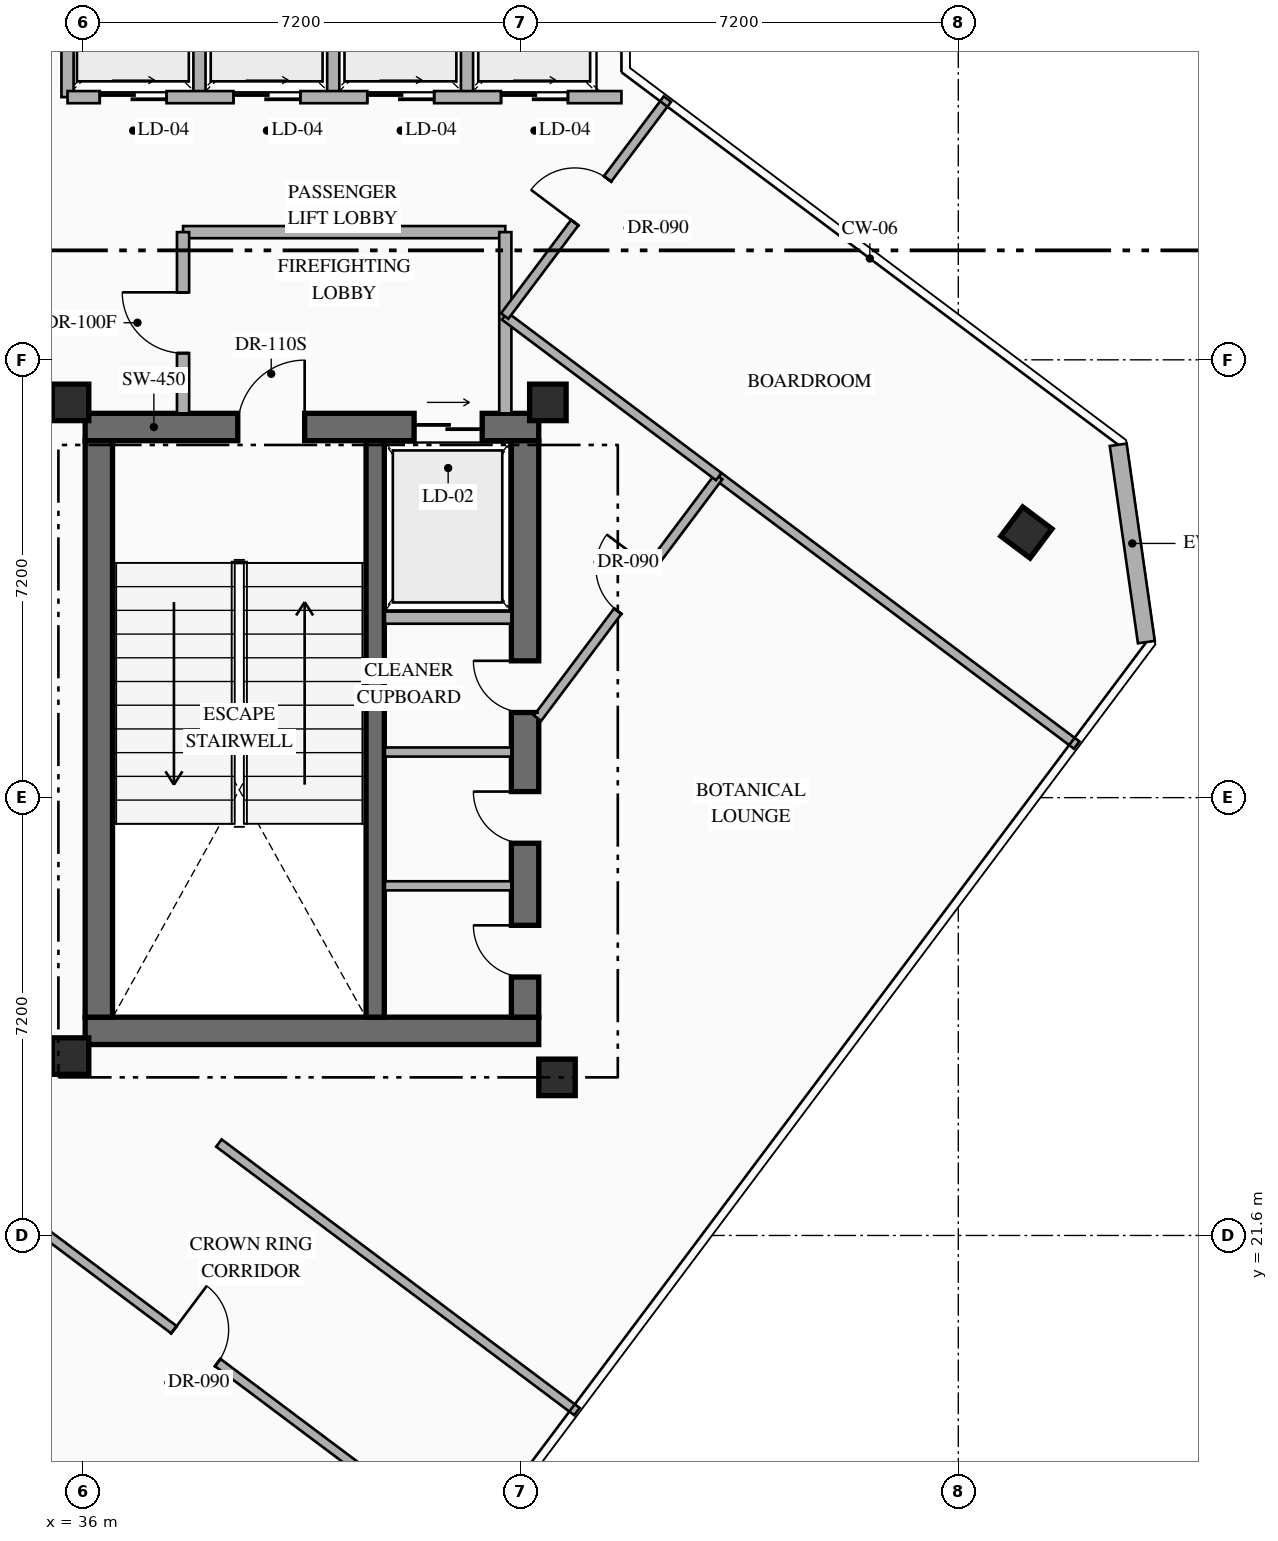
"""IFC4 building model, lengths in metres.
Left out: names, types, materials, properties, quantities, classifications, styles, units other than length and angle.
Written with IfcOpenShell. Run it as: python <this file> out.ifc"""

import sys

from ifc_helpers import new_model, si_unit, direction, frame, frame_2d, origin, origin_2d, place, context, subcontext, project, spatial, rectangle, hollow_rectangle, extrude, element, fill, save


model = new_model("IFC4")
c1 = context("Model", 3, precision=1e-05, world=origin(), true_north=direction((0.0, 1.0)))
c2 = subcontext(c1, "Body", "Model", "MODEL_VIEW")
j1 = project(units=[si_unit("LENGTHUNIT", "METRE"), si_unit("PLANEANGLEUNIT", "RADIAN")], contexts=[c1])
p1 = place(None, origin())
s1 = spatial("IfcSite", under=j1, at=p1, CompositionType="ELEMENT")
p2 = place(p1, origin())
s2 = spatial("IfcBuilding", under=s1, at=p2, CompositionType="ELEMENT")
p3 = place(p2, frame((0.0, 0.0, 273.95)))
s3 = spatial("IfcBuildingStorey", under=s2, at=p3, CompositionType="ELEMENT", Elevation=273.95)
p4 = place(p3, frame((36.04, 24.965, 0.0), z_axis=(0.0, 0.0, 1.0), x_axis=(1.0, 0.0, 0.0)))
e1 = element("IfcWall", 1, at=p4, inside=s3, PredefinedType="SHEAR", context=c2, shape_type="SweptSolid", body=[
    extrude(rectangle(XDim=7.46, YDim=0.45, at=frame_2d((3.73, 0.0))), origin(), (0.0, 0.0, 1.0), 4.0),
])
p5 = place(p3, frame((36.04, 34.895, 0.0), z_axis=(0.0, 0.0, 1.0), x_axis=(1.0, 0.0, 0.0)))
e2 = element("IfcWall", 2, at=p5, inside=s3, PredefinedType="SHEAR", context=c2, shape_type="SweptSolid", body=[
    extrude(rectangle(XDim=7.46, YDim=0.45, at=frame_2d((3.73, 0.0))), origin(), (0.0, 0.0, 1.0), 4.0),
])
p6 = place(p5, frame((2.51, 0.0, 0.0)))
e3 = element("IfcOpeningElement", 3, at=p6, cuts=e2, PredefinedType="OPENING", context=c2, shape_type="SweptSolid", body=[
    extrude(rectangle(XDim=1.1, YDim=2.2, at=frame_2d((0.55, 1.1))), frame((0.0, 0.235, 0.0), z_axis=(0.0, -1.0, 0.0), x_axis=(1.0, 0.0, 0.0)), (0.0, 0.0, 1.0), 0.47),
])
p7 = place(p5, frame((5.41, 0.0, 0.0)))
e4 = element("IfcOpeningElement", 4, at=p7, cuts=e2, PredefinedType="OPENING", context=c2, shape_type="SweptSolid", body=[
    extrude(rectangle(XDim=1.12, YDim=2.15, at=frame_2d((0.56, 1.075))), frame((0.0, 0.235, 0.0), z_axis=(0.0, -1.0, 0.0), x_axis=(1.0, 0.0, 0.0)), (0.0, 0.0, 1.0), 0.47),
])
p8 = place(p3, frame((36.265, 25.19, 0.0), z_axis=(0.0, 0.0, 1.0), x_axis=(0.0, 1.0, 0.0)))
e5 = element("IfcWall", 5, at=p8, inside=s3, PredefinedType="SHEAR", context=c2, shape_type="SweptSolid", body=[
    extrude(rectangle(XDim=9.48, YDim=0.45, at=frame_2d((4.74, 0.0))), origin(), (0.0, 0.0, 1.0), 4.0),
])
p9 = place(p3, frame((43.275, 25.19, 0.0), z_axis=(0.0, 0.0, 1.0), x_axis=(0.0, 1.0, 0.0)))
e6 = element("IfcWall", 6, at=p9, inside=s3, PredefinedType="SHEAR", context=c2, shape_type="SweptSolid", body=[
    extrude(rectangle(XDim=9.48, YDim=0.45, at=frame_2d((4.74, 0.0))), origin(), (0.0, 0.0, 1.0), 4.0),
])
p10 = place(p9, frame((0.66, 0.0, 0.0)))
e7 = element("IfcOpeningElement", 7, at=p10, cuts=e6, PredefinedType="OPENING", context=c2, shape_type="SweptSolid", body=[
    extrude(rectangle(XDim=0.85, YDim=2.08, at=frame_2d((0.425, 1.04))), frame((0.0, 0.235, 0.0), z_axis=(0.0, -1.0, 0.0), x_axis=(1.0, 0.0, 0.0)), (0.0, 0.0, 1.0), 0.47),
])
p11 = place(p9, frame((2.86, 0.0, 0.0)))
e8 = element("IfcOpeningElement", 8, at=p11, cuts=e6, PredefinedType="OPENING", context=c2, shape_type="SweptSolid", body=[
    extrude(rectangle(XDim=0.85, YDim=2.08, at=frame_2d((0.425, 1.04))), frame((0.0, 0.235, 0.0), z_axis=(0.0, -1.0, 0.0), x_axis=(1.0, 0.0, 0.0)), (0.0, 0.0, 1.0), 0.47),
])
p12 = place(p9, frame((5.01, 0.0, 0.0)))
e9 = element("IfcOpeningElement", 9, at=p12, cuts=e6, PredefinedType="OPENING", context=c2, shape_type="SweptSolid", body=[
    extrude(rectangle(XDim=0.85, YDim=2.08, at=frame_2d((0.425, 1.04))), frame((0.0, 0.235, 0.0), z_axis=(0.0, -1.0, 0.0), x_axis=(1.0, 0.0, 0.0)), (0.0, 0.0, 1.0), 0.47),
])
p13 = place(p3, frame((40.81, 25.19, 0.0), z_axis=(0.0, 0.0, 1.0), x_axis=(0.0, 1.0, 0.0)))
e10 = element("IfcWall", 10, at=p13, inside=s3, PredefinedType="SHEAR", context=c2, shape_type="SweptSolid", body=[
    extrude(rectangle(XDim=9.48, YDim=0.3, at=frame_2d((4.74, 0.0))), origin(), (0.0, 0.0, 1.0), 4.0),
])
for number, where, z_axis, x_axis in (
    (11, (35.8, 24.55, 0.0), (0.0, 0.0, 1.0), (1.0, 0.0, 0.0)),
    (12, (43.8, 24.2, 0.0), (0.0, 0.0, 1.0), (1.0, 0.0, 0.0)),
    (13, (35.8, 35.3, 0.0), (0.0, 0.0, 1.0), (1.0, 0.0, 0.0)),
    (14, (43.65, 35.3, 0.0), (0.0, 0.0, 1.0), (1.0, 0.0, 0.0)),
    (15, (51.52, 33.16, 0.0), (0.0, 0.0, 1.0), (0.8, -0.6, 0.0)),
):
    element("IfcColumn", number, at=place(p3, frame(where, z_axis=z_axis, x_axis=x_axis)), inside=s3, PredefinedType="COLUMN", context=c2, shape_type="SweptSolid", body=[
        extrude(hollow_rectangle(XDim=0.6, YDim=0.6, WallThickness=0.025, at=origin_2d()), origin(), (0.0, 0.0, 1.0), 4.0),
    ])
p14 = place(p3, frame((53.03, 34.603, 0.0), z_axis=(0.0, 0.0, 1.0), x_axis=(0.141212810973, -0.989979263428, 0.0)))
e16 = element("IfcWall", 16, at=p14, inside=s3, PredefinedType="STANDARD", context=c2, shape_type="SweptSolid", body=[
    extrude(rectangle(XDim=3.278, YDim=0.28, at=frame_2d((1.639, 0.0))), origin(), (0.0, 0.0, 1.0), 3.75),
])
p15 = place(p3, frame((40.97, 31.76, 0.0), z_axis=(0.0, 0.0, 1.0), x_axis=(1.0, 0.0, 0.0)))
e17 = element("IfcWall", 17, at=p15, inside=s3, PredefinedType="STANDARD", context=c2, shape_type="SweptSolid", body=[
    extrude(rectangle(XDim=2.08, YDim=0.2, at=frame_2d((1.04, 0.0))), origin(), (0.0, 0.0, 1.0), 3.75),
])
for number, where, z_axis, x_axis in (
    (18, (40.97, 27.35, 0.0), (0.0, 0.0, 1.0), (1.0, 0.0, 0.0)),
    (19, (40.97, 29.55, 0.0), (0.0, 0.0, 1.0), (1.0, 0.0, 0.0)),
):
    element("IfcWall", number, at=place(p3, frame(where, z_axis=z_axis, x_axis=x_axis)), inside=s3, PredefinedType="PARTITIONING", context=c2, shape_type="SweptSolid", body=[
        extrude(rectangle(XDim=2.08, YDim=0.15, at=frame_2d((1.04, 0.0))), origin(), (0.0, 0.0, 1.0), 3.75),
    ])
p16 = place(p3, frame((37.65, 38.1, 0.0), z_axis=(0.0, 0.0, 1.0), x_axis=(1.0, 0.0, 0.0)))
e20 = element("IfcWall", 20, at=p16, inside=s3, PredefinedType="STANDARD", context=c2, shape_type="SweptSolid", body=[
    extrude(rectangle(XDim=5.3, YDim=0.2, at=frame_2d((2.65, 0.0))), origin(), (0.0, 0.0, 1.0), 3.75),
])
p17 = place(p3, frame((42.95, 35.12, 0.0), z_axis=(0.0, 0.0, 1.0), x_axis=(0.0, 1.0, 0.0)))
e21 = element("IfcWall", 21, at=p17, inside=s3, PredefinedType="STANDARD", context=c2, shape_type="SweptSolid", body=[
    extrude(rectangle(XDim=2.98, YDim=0.2, at=frame_2d((1.49, 0.0))), origin(), (0.0, 0.0, 1.0), 3.75),
])
p18 = place(p3, frame((37.65, 35.12, 0.0), z_axis=(0.0, 0.0, 1.0), x_axis=(0.0, 1.0, 0.0)))
e22 = element("IfcWall", 22, at=p18, inside=s3, PredefinedType="STANDARD", context=c2, shape_type="SweptSolid", body=[
    extrude(rectangle(XDim=2.98, YDim=0.2, at=frame_2d((1.49, 0.0))), origin(), (0.0, 0.0, 1.0), 3.75),
])
p19 = place(p18, frame((0.99, 0.0, 0.0)))
e23 = element("IfcOpeningElement", 23, at=p19, cuts=e22, PredefinedType="OPENING", context=c2, shape_type="SweptSolid", body=[
    extrude(rectangle(XDim=1.0, YDim=2.2, at=frame_2d((0.5, 1.1))), frame((0.0, 0.11, 0.0), z_axis=(0.0, -1.0, 0.0), x_axis=(1.0, 0.0, 0.0)), (0.0, 0.0, 1.0), 0.22),
])
for number, where, z_axis, x_axis in (
    (24, (35.75, 40.32, 0.0), (0.0, 0.0, 1.0), (0.0, 1.0, 0.0)),
    (25, (37.92, 40.32, 0.0), (0.0, 0.0, 1.0), (0.0, 1.0, 0.0)),
    (26, (40.12, 40.32, 0.0), (0.0, 0.0, 1.0), (0.0, 1.0, 0.0)),
    (27, (42.32, 40.32, 0.0), (0.0, 0.0, 1.0), (0.0, 1.0, 0.0)),
):
    element("IfcWall", number, at=place(p3, frame(where, z_axis=z_axis, x_axis=x_axis)), inside=s3, PredefinedType="STANDARD", context=c2, shape_type="SweptSolid", body=[
        extrude(rectangle(XDim=2.16, YDim=0.2, at=frame_2d((1.08, 0.0))), origin(), (0.0, 0.0, 1.0), 3.75),
    ])
p20 = place(p3, frame((35.75, 40.32, 0.0), z_axis=(0.0, 0.0, 1.0), x_axis=(1.0, 0.0, 0.0)))
e28 = element("IfcWall", 28, at=p20, inside=s3, PredefinedType="STANDARD", context=c2, shape_type="SweptSolid", body=[
    extrude(rectangle(XDim=9.11, YDim=0.2, at=frame_2d((4.555, 0.0))), origin(), (0.0, 0.0, 1.0), 3.75),
])
p21 = place(p20, frame((0.53, 0.0, 0.0)))
e29 = element("IfcOpeningElement", 29, at=p21, cuts=e28, PredefinedType="OPENING", context=c2, shape_type="SweptSolid", body=[
    extrude(rectangle(XDim=1.1, YDim=2.18, at=frame_2d((0.55, 1.09))), frame((0.0, 0.11, 0.0), z_axis=(0.0, -1.0, 0.0), x_axis=(1.0, 0.0, 0.0)), (0.0, 0.0, 1.0), 0.22),
])
p22 = place(p20, frame((2.73, 0.0, 0.0)))
e30 = element("IfcOpeningElement", 30, at=p22, cuts=e28, PredefinedType="OPENING", context=c2, shape_type="SweptSolid", body=[
    extrude(rectangle(XDim=1.1, YDim=2.18, at=frame_2d((0.55, 1.09))), frame((0.0, 0.11, 0.0), z_axis=(0.0, -1.0, 0.0), x_axis=(1.0, 0.0, 0.0)), (0.0, 0.0, 1.0), 0.22),
])
p23 = place(p20, frame((4.93, 0.0, 0.0)))
e31 = element("IfcOpeningElement", 31, at=p23, cuts=e28, PredefinedType="OPENING", context=c2, shape_type="SweptSolid", body=[
    extrude(rectangle(XDim=1.1, YDim=2.18, at=frame_2d((0.55, 1.09))), frame((0.0, 0.11, 0.0), z_axis=(0.0, -1.0, 0.0), x_axis=(1.0, 0.0, 0.0)), (0.0, 0.0, 1.0), 0.22),
])
p24 = place(p20, frame((7.13, 0.0, 0.0)))
e32 = element("IfcOpeningElement", 32, at=p24, cuts=e28, PredefinedType="OPENING", context=c2, shape_type="SweptSolid", body=[
    extrude(rectangle(XDim=1.1, YDim=2.18, at=frame_2d((0.55, 1.09))), frame((0.0, 0.11, 0.0), z_axis=(0.0, -1.0, 0.0), x_axis=(1.0, 0.0, 0.0)), (0.0, 0.0, 1.0), 0.22),
])
p25 = place(p3, frame((28.18, 27.04, 0.0), z_axis=(0.0, 0.0, 1.0), x_axis=(0.8, -0.6, 0.0)))
e33 = element("IfcWall", 33, at=p25, inside=s3, PredefinedType="PARTITIONING", context=c2, shape_type="SweptSolid", body=[
    extrude(rectangle(XDim=17.76, YDim=0.15, at=frame_2d((8.88, 0.0))), origin(), (0.0, 0.0, 1.0), 3.75),
])
p26 = place(p25, frame((11.65, 0.0, 0.0)))
e34 = element("IfcOpeningElement", 34, at=p26, cuts=e33, PredefinedType="OPENING", context=c2, shape_type="SweptSolid", body=[
    extrude(rectangle(XDim=0.9, YDim=2.15, at=frame_2d((0.45, 1.075))), frame((0.0, 0.085, 0.0), z_axis=(0.0, -1.0, 0.0), x_axis=(1.0, 0.0, 0.0)), (0.0, 0.0, 1.0), 0.17),
])
for number, where, z_axis, x_axis in (
    (35, (38.24, 23.12, 0.0), (0.0, 0.0, 1.0), (0.8, -0.6, 0.0)),
    (36, (46.46, 34.08, 0.0), (0.0, 0.0, 1.0), (0.8, -0.6, 0.0)),
):
    element("IfcWall", number, at=place(p3, frame(where, z_axis=z_axis, x_axis=x_axis)), inside=s3, PredefinedType="PARTITIONING", context=c2, shape_type="SweptSolid", body=[
        extrude(rectangle(XDim=7.36, YDim=0.15, at=frame_2d((3.68, 0.0))), origin(), (0.0, 0.0, 1.0), 3.75),
    ])
p27 = place(p3, frame((43.48, 30.107, 0.0), z_axis=(0.0, 0.0, 1.0), x_axis=(0.600015730265, 0.799988202059, 0.0)))
e37 = element("IfcWall", 37, at=p27, inside=s3, PredefinedType="PARTITIONING", context=c2, shape_type="SweptSolid", body=[
    extrude(rectangle(XDim=4.967, YDim=0.15, at=frame_2d((2.483, 0.0))), origin(), (0.0, 0.0, 1.0), 3.75),
])
p28 = place(p27, frame((2.199, 0.0, 0.0)))
e38 = element("IfcOpeningElement", 38, at=p28, cuts=e37, PredefinedType="OPENING", context=c2, shape_type="SweptSolid", body=[
    extrude(rectangle(XDim=0.9, YDim=2.15, at=frame_2d((0.45, 1.075))), frame((0.0, 0.085, 0.0), z_axis=(0.0, -1.0, 0.0), x_axis=(1.0, 0.0, 0.0)), (0.0, 0.0, 1.0), 0.17),
])
p29 = place(p3, frame((42.94, 36.72, 0.0), z_axis=(0.0, 0.0, 1.0), x_axis=(0.800013316712, -0.599982243973, 0.0)))
e39 = element("IfcWall", 39, at=p29, inside=s3, PredefinedType="PARTITIONING", context=c2, shape_type="SweptSolid", body=[
    extrude(rectangle(XDim=4.4, YDim=0.15, at=frame_2d((2.2, 0.0))), origin(), (0.0, 0.0, 1.0), 3.295),
])
p30 = place(p3, frame((42.94, 36.72, 0.0), z_axis=(0.0, 0.0, 1.0), x_axis=(0.599991241767, 0.8000065686, 0.0)))
e40 = element("IfcWall", 40, at=p30, inside=s3, PredefinedType="PARTITIONING", context=c2, shape_type="SweptSolid", body=[
    extrude(rectangle(XDim=4.46, YDim=0.15, at=frame_2d((2.23, 0.0))), origin(), (0.0, 0.0, 1.0), 3.75),
])
p31 = place(p30, frame((1.92, 0.0, 0.0)))
e41 = element("IfcOpeningElement", 41, at=p31, cuts=e40, PredefinedType="OPENING", context=c2, shape_type="SweptSolid", body=[
    extrude(rectangle(XDim=0.9, YDim=2.15, at=frame_2d((0.45, 1.075))), frame((0.0, 0.085, 0.0), z_axis=(0.0, -1.0, 0.0), x_axis=(1.0, 0.0, 0.0)), (0.0, 0.0, 1.0), 0.17),
])
p32 = place(p6, origin())
e42 = element("IfcDoor", 42, at=p32, inside=s3, OperationType="SINGLE_SWING_RIGHT", PredefinedType="DOOR", context=c2, shape_type="SweptSolid", body=[
    extrude(rectangle(XDim=1.1, YDim=2.2, at=frame_2d((0.55, 1.1))), frame((0.0, 0.025, 0.0), z_axis=(0.0, -1.0, 0.0), x_axis=(1.0, 0.0, 0.0)), (0.0, 0.0, 1.0), 0.05),
])
fill(e3, e42)
p33 = place(p7, origin())
e43 = element("IfcDoor", 43, at=p33, inside=s3, OperationType="SLIDING_TO_RIGHT", PredefinedType="USERDEFINED", context=c2, shape_type="SweptSolid", body=[
    extrude(rectangle(XDim=1.12, YDim=2.15, at=frame_2d((0.56, 1.075))), frame((0.0, 0.025, 0.0), z_axis=(0.0, -1.0, 0.0), x_axis=(1.0, 0.0, 0.0)), (0.0, 0.0, 1.0), 0.05),
])
fill(e4, e43)
p34 = place(p10, origin())
e44 = element("IfcDoor", 44, at=p34, inside=s3, OperationType="SINGLE_SWING_RIGHT", PredefinedType="DOOR", context=c2, shape_type="SweptSolid", body=[
    extrude(rectangle(XDim=0.85, YDim=2.08, at=frame_2d((0.425, 1.04))), frame((0.0, 0.025, 0.0), z_axis=(0.0, -1.0, 0.0), x_axis=(1.0, 0.0, 0.0)), (0.0, 0.0, 1.0), 0.05),
])
fill(e7, e44)
p35 = place(p11, origin())
e45 = element("IfcDoor", 45, at=p35, inside=s3, OperationType="SINGLE_SWING_RIGHT", PredefinedType="DOOR", context=c2, shape_type="SweptSolid", body=[
    extrude(rectangle(XDim=0.85, YDim=2.08, at=frame_2d((0.425, 1.04))), frame((0.0, 0.025, 0.0), z_axis=(0.0, -1.0, 0.0), x_axis=(1.0, 0.0, 0.0)), (0.0, 0.0, 1.0), 0.05),
])
fill(e8, e45)
p36 = place(p12, origin())
e46 = element("IfcDoor", 46, at=p36, inside=s3, OperationType="SINGLE_SWING_RIGHT", PredefinedType="DOOR", context=c2, shape_type="SweptSolid", body=[
    extrude(rectangle(XDim=0.85, YDim=2.08, at=frame_2d((0.425, 1.04))), frame((0.0, 0.025, 0.0), z_axis=(0.0, -1.0, 0.0), x_axis=(1.0, 0.0, 0.0)), (0.0, 0.0, 1.0), 0.05),
])
fill(e9, e46)
p37 = place(p19, origin())
e47 = element("IfcDoor", 47, at=p37, inside=s3, OperationType="SINGLE_SWING_RIGHT", PredefinedType="DOOR", context=c2, shape_type="SweptSolid", body=[
    extrude(rectangle(XDim=1.0, YDim=2.2, at=frame_2d((0.5, 1.1))), frame((0.0, 0.025, 0.0), z_axis=(0.0, -1.0, 0.0), x_axis=(1.0, 0.0, 0.0)), (0.0, 0.0, 1.0), 0.05),
])
fill(e23, e47)
p38 = place(p21, origin())
e48 = element("IfcDoor", 48, at=p38, inside=s3, OperationType="SLIDING_TO_RIGHT", PredefinedType="USERDEFINED", context=c2, shape_type="SweptSolid", body=[
    extrude(rectangle(XDim=1.1, YDim=2.18, at=frame_2d((0.55, 1.09))), frame((0.0, 0.025, 0.0), z_axis=(0.0, -1.0, 0.0), x_axis=(1.0, 0.0, 0.0)), (0.0, 0.0, 1.0), 0.05),
])
fill(e29, e48)
p39 = place(p22, origin())
e49 = element("IfcDoor", 49, at=p39, inside=s3, OperationType="SLIDING_TO_RIGHT", PredefinedType="USERDEFINED", context=c2, shape_type="SweptSolid", body=[
    extrude(rectangle(XDim=1.1, YDim=2.18, at=frame_2d((0.55, 1.09))), frame((0.0, 0.025, 0.0), z_axis=(0.0, -1.0, 0.0), x_axis=(1.0, 0.0, 0.0)), (0.0, 0.0, 1.0), 0.05),
])
fill(e30, e49)
p40 = place(p23, origin())
e50 = element("IfcDoor", 50, at=p40, inside=s3, OperationType="SLIDING_TO_RIGHT", PredefinedType="USERDEFINED", context=c2, shape_type="SweptSolid", body=[
    extrude(rectangle(XDim=1.1, YDim=2.18, at=frame_2d((0.55, 1.09))), frame((0.0, 0.025, 0.0), z_axis=(0.0, -1.0, 0.0), x_axis=(1.0, 0.0, 0.0)), (0.0, 0.0, 1.0), 0.05),
])
fill(e31, e50)
p41 = place(p24, origin())
e51 = element("IfcDoor", 51, at=p41, inside=s3, OperationType="SLIDING_TO_RIGHT", PredefinedType="USERDEFINED", context=c2, shape_type="SweptSolid", body=[
    extrude(rectangle(XDim=1.1, YDim=2.18, at=frame_2d((0.55, 1.09))), frame((0.0, 0.025, 0.0), z_axis=(0.0, -1.0, 0.0), x_axis=(1.0, 0.0, 0.0)), (0.0, 0.0, 1.0), 0.05),
])
fill(e32, e51)
p42 = place(p26, origin())
e52 = element("IfcDoor", 52, at=p42, inside=s3, OperationType="SINGLE_SWING_LEFT", PredefinedType="DOOR", context=c2, shape_type="SweptSolid", body=[
    extrude(rectangle(XDim=0.9, YDim=2.15, at=frame_2d((0.45, 1.075))), frame((0.0, 0.025, 0.0), z_axis=(0.0, -1.0, 0.0), x_axis=(1.0, 0.0, 0.0)), (0.0, 0.0, 1.0), 0.05),
])
fill(e34, e52)
p43 = place(p28, origin())
e53 = element("IfcDoor", 53, at=p43, inside=s3, OperationType="SINGLE_SWING_RIGHT", PredefinedType="DOOR", context=c2, shape_type="SweptSolid", body=[
    extrude(rectangle(XDim=0.9, YDim=2.15, at=frame_2d((0.45, 1.075))), frame((0.0, 0.025, 0.0), z_axis=(0.0, -1.0, 0.0), x_axis=(1.0, 0.0, 0.0)), (0.0, 0.0, 1.0), 0.05),
])
fill(e38, e53)
p44 = place(p31, origin())
e54 = element("IfcDoor", 54, at=p44, inside=s3, OperationType="SINGLE_SWING_LEFT", PredefinedType="DOOR", context=c2, shape_type="SweptSolid", body=[
    extrude(rectangle(XDim=0.9, YDim=2.15, at=frame_2d((0.45, 1.075))), frame((0.0, 0.025, 0.0), z_axis=(0.0, -1.0, 0.0), x_axis=(1.0, 0.0, 0.0)), (0.0, 0.0, 1.0), 0.05),
])
fill(e41, e54)
save(model, sys.argv[1])
